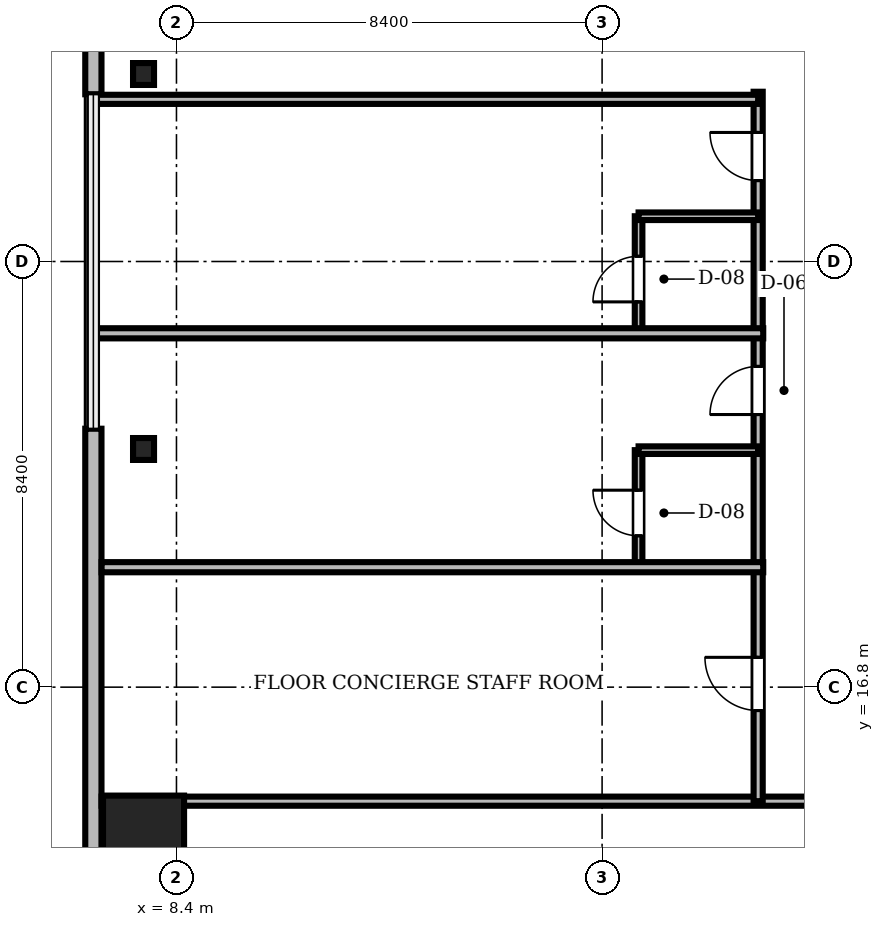
"""IFC4 building model, lengths in metres.
Left out: names, types, materials, properties, quantities, classifications, styles, units other than length and angle.
Written with IfcOpenShell. Run it as: python <this file> out.ifc"""

import sys

from ifc_helpers import new_model, si_unit, direction, frame, frame_2d, origin, origin_2d, place, context, subcontext, project, spatial, rectangle, i_section, extrude, source, transform, mapped, element, fill, save


model = new_model("IFC4")
c1 = context("Model", 3, precision=1e-05, world=origin(), true_north=direction((0.0, 1.0)))
c2 = subcontext(c1, "Body", "Model", "MODEL_VIEW")
j1 = project(units=[si_unit("LENGTHUNIT", "METRE"), si_unit("PLANEANGLEUNIT", "RADIAN")], contexts=[c1])
p1 = place(None, origin())
s1 = spatial("IfcSite", under=j1, at=p1, CompositionType="ELEMENT")
p2 = place(p1, origin())
s2 = spatial("IfcBuilding", under=s1, at=p2, CompositionType="ELEMENT")
p3 = place(p2, frame((0.0, 0.0, 148.3)))
s3 = spatial("IfcBuildingStorey", under=s2, at=p3, CompositionType="ELEMENT", Elevation=148.3)
m1 = source(origin(), c2, "Body", "SweptSolid", [
    extrude(rectangle(XDim=1.6, YDim=1.6, at=origin_2d()), origin(), (0.0, 0.0, 1.0), 3.46),
])
p4 = place(p3, frame((7.75, 13.86, 0.0), z_axis=(0.0, 0.0, 1.0), x_axis=(1.0, 0.0, 0.0)))
e1 = element("IfcColumn", 1, at=p4, inside=s3, PredefinedType="COLUMN", context=c2, shape_type="MappedRepresentation", body=[
    mapped(m1, transform((0.0, 0.0, 0.0), scale=1.0)),
])
m2 = source(origin(), c2, "Body", "SweptSolid", [
    extrude(i_section(OverallWidth=0.414, OverallDepth=0.432, WebThickness=0.026, FlangeThickness=0.04, FilletRadius=0.015, at=origin_2d()), origin(), (0.0, 0.0, 1.0), 3.46),
])
for number, where, z_axis, x_axis in (
    (2, (7.75, 28.9, 0.0), (0.0, 0.0, 1.0), (1.0, 0.0, 0.0)),
    (3, (7.75, 21.5, 0.0), (0.0, 0.0, 1.0), (1.0, 0.0, 0.0)),
):
    element("IfcColumn", number, at=place(p3, frame(where, z_axis=z_axis, x_axis=x_axis)), inside=s3, PredefinedType="COLUMN", context=c2, shape_type="MappedRepresentation", body=[
        mapped(m2, transform((0.0, 0.0, 0.0), scale=1.0)),
    ])
m3 = source(origin(), c2, "Body", "SweptSolid", [
    extrude(rectangle(XDim=15.6, YDim=0.32, at=frame_2d((7.8, 0.0))), origin(), (0.0, 0.0, 1.0), 3.46),
])
p5 = place(p3, frame((6.76, 44.1, 0.0), z_axis=(0.0, 0.0, 1.0), x_axis=(0.0, -1.0, 0.0)))
e4 = element("IfcWall", 4, at=p5, inside=s3, PredefinedType="SOLIDWALL", context=c2, shape_type="MappedRepresentation", body=[
    mapped(m3, transform((0.0, 0.0, 0.0), scale=1.0)),
])
m4 = source(origin(), c2, "Body", "SweptSolid", [
    extrude(rectangle(XDim=1.4, YDim=2.3, at=frame_2d((0.7, 1.15))), frame((0.0, 0.17, 0.0), z_axis=(0.0, -1.0, 0.0), x_axis=(1.0, 0.0, 0.0)), (0.0, 0.0, 1.0), 0.34),
])
p6 = place(p5, frame((9.61, 0.0, 0.0)))
e5 = element("IfcOpeningElement", 5, at=p6, cuts=e4, PredefinedType="OPENING", context=c2, shape_type="MappedRepresentation", body=[
    mapped(m4, transform((0.0, 0.0, 0.0), scale=1.0)),
])
m5 = source(origin(), c2, "Body", "SweptSolid", [
    extrude(rectangle(XDim=2.8, YDim=2.4, at=frame_2d((1.4, 1.2))), frame((0.0, 0.17, 0.0), z_axis=(0.0, -1.0, 0.0), x_axis=(1.0, 0.0, 0.0)), (0.0, 0.0, 1.0), 0.34),
])
p7 = place(p5, frame((2.705, 0.0, 0.72)))
e6 = element("IfcOpeningElement", 6, at=p7, cuts=e4, PredefinedType="OPENING", context=c2, shape_type="MappedRepresentation", body=[
    mapped(m5, transform((0.0, 0.0, 0.0), scale=1.0)),
])
m6 = source(origin(), c2, "Body", "SweptSolid", [
    extrude(rectangle(XDim=15.6, YDim=0.32, at=frame_2d((7.8, 0.0))), origin(), (0.0, 0.0, 1.0), 3.46),
])
p8 = place(p3, frame((6.76, 21.9, 0.0), z_axis=(0.0, 0.0, 1.0), x_axis=(0.0, -1.0, 0.0)))
e7 = element("IfcWall", 7, at=p8, inside=s3, PredefinedType="SOLIDWALL", context=c2, shape_type="MappedRepresentation", body=[
    mapped(m6, transform((0.0, 0.0, 0.0), scale=1.0)),
])
p9 = place(p8, frame((10.095, 0.0, 0.72)))
e8 = element("IfcOpeningElement", 8, at=p9, cuts=e7, PredefinedType="OPENING", context=c2, shape_type="MappedRepresentation", body=[
    mapped(m5, transform((0.0, 0.0, 0.0), scale=1.0)),
])
m7 = source(origin(), c2, "Body", "SweptSolid", [
    extrude(rectangle(XDim=46.156, YDim=0.18, at=frame_2d((23.078, 0.0))), origin(), (0.0, 0.0, 1.0), 2.702),
])
p10 = place(p3, frame((6.922, 14.55, 0.0), z_axis=(0.0, 0.0, 1.0), x_axis=(1.0, 0.0, 0.0)))
e9 = element("IfcWall", 9, at=p10, inside=s3, PredefinedType="PARTITIONING", context=c2, shape_type="MappedRepresentation", body=[
    mapped(m7, transform((0.0, 0.0, 0.0), scale=1.0)),
])
m8 = source(origin(), c2, "Body", "SweptSolid", [
    extrude(rectangle(XDim=1.05, YDim=2.2, at=frame_2d((0.525, 1.1))), frame((0.0, 0.1, 0.0), z_axis=(0.0, -1.0, 0.0), x_axis=(1.0, 0.0, 0.0)), (0.0, 0.0, 1.0), 0.2),
])
p11 = place(p10, frame((14.338, 0.0, 0.0)))
e10 = element("IfcOpeningElement", 10, at=p11, cuts=e9, PredefinedType="OPENING", context=c2, shape_type="MappedRepresentation", body=[
    mapped(m8, transform((0.0, 0.0, 0.0), scale=1.0)),
])
p12 = place(p10, frame((17.878, 0.0, 0.0)))
e11 = element("IfcOpeningElement", 11, at=p12, cuts=e9, PredefinedType="OPENING", context=c2, shape_type="MappedRepresentation", body=[
    mapped(m8, transform((0.0, 0.0, 0.0), scale=1.0)),
])
p13 = place(p10, frame((23.477, 0.0, 0.0)))
e12 = element("IfcOpeningElement", 12, at=p13, cuts=e9, PredefinedType="OPENING", context=c2, shape_type="MappedRepresentation", body=[
    mapped(m8, transform((0.0, 0.0, 0.0), scale=1.0)),
])
p14 = place(p10, frame((29.256, 0.0, 0.0)))
e13 = element("IfcOpeningElement", 13, at=p14, cuts=e9, PredefinedType="OPENING", context=c2, shape_type="MappedRepresentation", body=[
    mapped(m8, transform((0.0, 0.0, 0.0), scale=1.0)),
])
p15 = place(p10, frame((35.035, 0.0, 0.0)))
e14 = element("IfcOpeningElement", 14, at=p15, cuts=e9, PredefinedType="OPENING", context=c2, shape_type="MappedRepresentation", body=[
    mapped(m8, transform((0.0, 0.0, 0.0), scale=1.0)),
])
p16 = place(p10, frame((41.766, 0.0, 0.0)))
e15 = element("IfcOpeningElement", 15, at=p16, cuts=e9, PredefinedType="OPENING", context=c2, shape_type="MappedRepresentation", body=[
    mapped(m8, transform((0.0, 0.0, 0.0), scale=1.0)),
])
m9 = source(origin(), c2, "Body", "SweptSolid", [
    extrude(rectangle(XDim=14.0, YDim=0.18, at=frame_2d((7.0, 0.0))), origin(), (0.0, 0.0, 1.0), 2.852),
])
p17 = place(p3, frame((19.88, 14.55, 0.0), z_axis=(0.0, 0.0, 1.0), x_axis=(0.0, 1.0, 0.0)))
e16 = element("IfcWall", 16, at=p17, inside=s3, PredefinedType="PARTITIONING", context=c2, shape_type="MappedRepresentation", body=[
    mapped(m9, transform((0.0, 0.0, 0.0), scale=1.0)),
])
p18 = place(p17, frame((1.788, 0.0, 0.0)))
e17 = element("IfcOpeningElement", 17, at=p18, cuts=e16, PredefinedType="OPENING", context=c2, shape_type="MappedRepresentation", body=[
    mapped(m8, transform((0.0, 0.0, 0.0), scale=1.0)),
])
m10 = source(origin(), c2, "Body", "SweptSolid", [
    extrude(rectangle(XDim=0.95, YDim=2.15, at=frame_2d((0.475, 1.075))), frame((0.0, 0.1, 0.0), z_axis=(0.0, -1.0, 0.0), x_axis=(1.0, 0.0, 0.0)), (0.0, 0.0, 1.0), 0.2),
])
p19 = place(p17, frame((7.63, 0.0, 0.0)))
e18 = element("IfcOpeningElement", 18, at=p19, cuts=e16, PredefinedType="OPENING", context=c2, shape_type="MappedRepresentation", body=[
    mapped(m10, transform((0.0, 0.0, 0.0), scale=1.0)),
])
p20 = place(p17, frame((12.247, 0.0, 0.0)))
e19 = element("IfcOpeningElement", 19, at=p20, cuts=e16, PredefinedType="OPENING", context=c2, shape_type="MappedRepresentation", body=[
    mapped(m10, transform((0.0, 0.0, 0.0), scale=1.0)),
])
m11 = source(origin(), c2, "Body", "SweptSolid", [
    extrude(rectangle(XDim=2.29, YDim=0.15, at=frame_2d((1.145, 0.0))), origin(), (0.0, 0.0, 1.0), 2.852),
])
p21 = place(p3, frame((17.52, 19.187, 0.0), z_axis=(0.0, 0.0, 1.0), x_axis=(0.0, 1.0, 0.0)))
e20 = element("IfcWall", 20, at=p21, inside=s3, PredefinedType="PARTITIONING", context=c2, shape_type="MappedRepresentation", body=[
    mapped(m11, transform((0.0, 0.0, 0.0), scale=1.0)),
])
m12 = source(origin(), c2, "Body", "SweptSolid", [
    extrude(rectangle(XDim=0.9, YDim=2.1, at=frame_2d((0.45, 1.05))), frame((0.0, 0.085, 0.0), z_axis=(0.0, -1.0, 0.0), x_axis=(1.0, 0.0, 0.0)), (0.0, 0.0, 1.0), 0.17),
])
p22 = place(p21, frame((0.6, 0.0, 0.0)))
e21 = element("IfcOpeningElement", 21, at=p22, cuts=e20, PredefinedType="OPENING", context=c2, shape_type="MappedRepresentation", body=[
    mapped(m12, transform((0.0, 0.0, 0.0), scale=1.0)),
])
m13 = source(origin(), c2, "Body", "SweptSolid", [
    extrude(rectangle(XDim=2.29, YDim=0.15, at=frame_2d((1.145, 0.0))), origin(), (0.0, 0.0, 1.0), 3.46),
])
p23 = place(p3, frame((17.52, 23.803, 0.0), z_axis=(0.0, 0.0, 1.0), x_axis=(0.0, 1.0, 0.0)))
e22 = element("IfcWall", 22, at=p23, inside=s3, PredefinedType="PARTITIONING", context=c2, shape_type="MappedRepresentation", body=[
    mapped(m13, transform((0.0, 0.0, 0.0), scale=1.0)),
])
p24 = place(p23, frame((0.6, 0.0, 0.0)))
e23 = element("IfcOpeningElement", 23, at=p24, cuts=e22, PredefinedType="OPENING", context=c2, shape_type="MappedRepresentation", body=[
    mapped(m12, transform((0.0, 0.0, 0.0), scale=1.0)),
])
m14 = source(origin(), c2, "Body", "SweptSolid", [
    extrude(rectangle(XDim=13.058, YDim=0.2, at=frame_2d((6.529, 0.0))), origin(), (0.0, 0.0, 1.0), 2.702),
])
p25 = place(p3, frame((6.922, 19.167, 0.0), z_axis=(0.0, 0.0, 1.0), x_axis=(1.0, 0.0, 0.0)))
e24 = element("IfcWall", 24, at=p25, inside=s3, PredefinedType="PARTITIONING", context=c2, shape_type="MappedRepresentation", body=[
    mapped(m14, transform((0.0, 0.0, 0.0), scale=1.0)),
])
m15 = source(origin(), c2, "Body", "SweptSolid", [
    extrude(rectangle(XDim=13.25, YDim=0.2, at=frame_2d((6.625, 0.0))), origin(), (0.0, 0.0, 1.0), 2.702),
])
p26 = place(p3, frame((6.73, 23.783, 0.0), z_axis=(0.0, 0.0, 1.0), x_axis=(1.0, 0.0, 0.0)))
e25 = element("IfcWall", 25, at=p26, inside=s3, PredefinedType="PARTITIONING", context=c2, shape_type="MappedRepresentation", body=[
    mapped(m15, transform((0.0, 0.0, 0.0), scale=1.0)),
])
m16 = source(origin(), c2, "Body", "SweptSolid", [
    extrude(rectangle(XDim=13.15, YDim=0.18, at=frame_2d((6.575, 0.0))), origin(), (0.0, 0.0, 1.0), 2.702),
])
p27 = place(p3, frame((6.73, 28.4, 0.0), z_axis=(0.0, 0.0, 1.0), x_axis=(1.0, 0.0, 0.0)))
e26 = element("IfcWall", 26, at=p27, inside=s3, PredefinedType="PARTITIONING", context=c2, shape_type="MappedRepresentation", body=[
    mapped(m16, transform((0.0, 0.0, 0.0), scale=1.0)),
])
m17 = source(origin(), c2, "Body", "SweptSolid", [
    extrude(rectangle(XDim=2.36, YDim=0.15, at=frame_2d((1.18, 0.0))), origin(), (0.0, 0.0, 1.0), 3.46),
])
for number, where, z_axis, x_axis in (
    (27, (17.52, 21.477, 0.0), (0.0, 0.0, 1.0), (1.0, 0.0, 0.0)),
    (28, (17.52, 26.093, 0.0), (0.0, 0.0, 1.0), (1.0, 0.0, 0.0)),
):
    element("IfcWall", number, at=place(p3, frame(where, z_axis=z_axis, x_axis=x_axis)), inside=s3, PredefinedType="PARTITIONING", context=c2, shape_type="MappedRepresentation", body=[
        mapped(m17, transform((0.0, 0.0, 0.0), scale=1.0)),
    ])
m18 = source(origin(), c2, "Body", "SweptSolid", [
    extrude(rectangle(XDim=1.05, YDim=2.2, at=frame_2d((0.525, 1.1))), frame((0.0, 0.025, 0.0), z_axis=(0.0, -1.0, 0.0), x_axis=(1.0, 0.0, 0.0)), (0.0, 0.0, 1.0), 0.05),
])
p28 = place(p18, origin())
e29 = element("IfcDoor", 29, at=p28, inside=s3, OperationType="SINGLE_SWING_RIGHT", PredefinedType="DOOR", context=c2, shape_type="MappedRepresentation", body=[
    mapped(m18, transform((0.0, 0.0, 0.0), scale=1.0)),
])
fill(e17, e29)
m19 = source(origin(), c2, "Body", "SweptSolid", [
    extrude(rectangle(XDim=0.95, YDim=2.15, at=frame_2d((0.475, 1.075))), frame((0.0, 0.025, 0.0), z_axis=(0.0, -1.0, 0.0), x_axis=(1.0, 0.0, 0.0)), (0.0, 0.0, 1.0), 0.05),
])
p29 = place(p19, origin())
e30 = element("IfcDoor", 30, at=p29, inside=s3, OperationType="SINGLE_SWING_LEFT", PredefinedType="DOOR", context=c2, shape_type="MappedRepresentation", body=[
    mapped(m19, transform((0.0, 0.0, 0.0), scale=1.0)),
])
fill(e18, e30)
p30 = place(p20, origin())
e31 = element("IfcDoor", 31, at=p30, inside=s3, OperationType="SINGLE_SWING_RIGHT", PredefinedType="DOOR", context=c2, shape_type="MappedRepresentation", body=[
    mapped(m19, transform((0.0, 0.0, 0.0), scale=1.0)),
])
fill(e19, e31)
m20 = source(origin(), c2, "Body", "SweptSolid", [
    extrude(rectangle(XDim=0.9, YDim=2.1, at=frame_2d((0.45, 1.05))), frame((0.0, 0.025, 0.0), z_axis=(0.0, -1.0, 0.0), x_axis=(1.0, 0.0, 0.0)), (0.0, 0.0, 1.0), 0.05),
])
p31 = place(p22, origin())
e32 = element("IfcDoor", 32, at=p31, inside=s3, OperationType="SINGLE_SWING_RIGHT", PredefinedType="DOOR", context=c2, shape_type="MappedRepresentation", body=[
    mapped(m20, transform((0.0, 0.0, 0.0), scale=1.0)),
])
fill(e21, e32)
p32 = place(p24, origin())
e33 = element("IfcDoor", 33, at=p32, inside=s3, OperationType="SINGLE_SWING_LEFT", PredefinedType="DOOR", context=c2, shape_type="MappedRepresentation", body=[
    mapped(m20, transform((0.0, 0.0, 0.0), scale=1.0)),
])
fill(e23, e33)
save(model, sys.argv[1])
